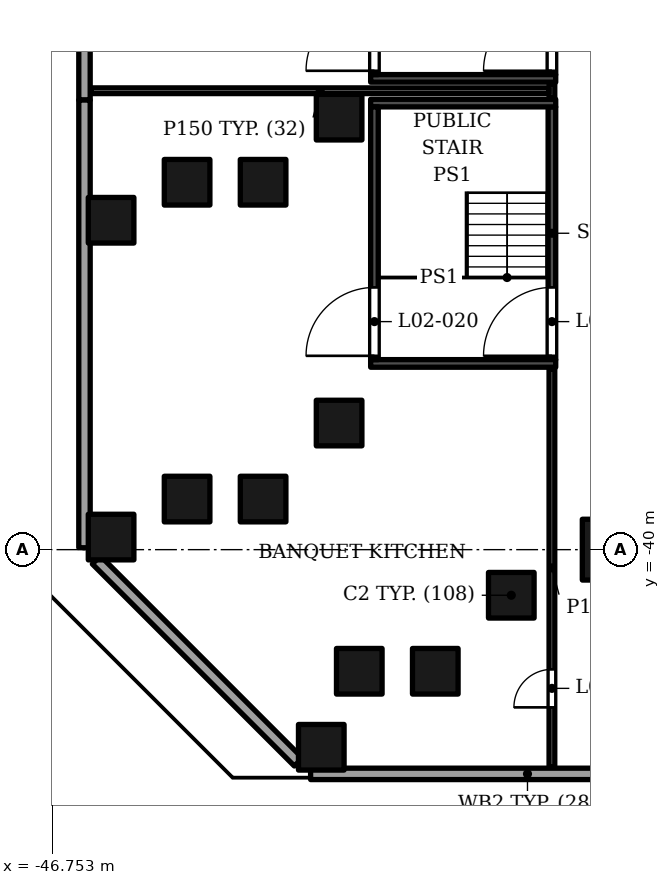
"""IFC4 building model, lengths in metres.
Left out: names, types, materials, properties, quantities, classifications, styles, units other than length and angle.
Written with IfcOpenShell. Run it as: python <this file> out.ifc"""

import sys

from ifc_helpers import new_model, si_unit, direction, frame, frame_2d, origin, origin_2d, place, context, subcontext, project, spatial, rectangle, extrude, element, fill, save


model = new_model("IFC4")
c1 = context("Model", 3, precision=1e-05, world=origin(), true_north=direction((0.0, 1.0)))
c2 = subcontext(c1, "Body", "Model", "MODEL_VIEW")
j1 = project(units=[si_unit("LENGTHUNIT", "METRE"), si_unit("PLANEANGLEUNIT", "RADIAN")], contexts=[c1])
p1 = place(None, origin())
s1 = spatial("IfcSite", under=j1, at=p1, CompositionType="ELEMENT")
p2 = place(p1, origin())
s2 = spatial("IfcBuilding", under=s1, at=p2, CompositionType="ELEMENT")
p3 = place(p2, frame((0.0, 0.0, 20.0)))
s3 = spatial("IfcBuildingStorey", under=s2, at=p3, CompositionType="ELEMENT", Elevation=20.0)
p4 = place(p3, frame((-32.0, -40.0, 0.0), z_axis=(0.0, 0.0, 1.0), x_axis=(1.0, 0.0, 0.0)))
e1 = element("IfcColumn", 1, at=p4, inside=s3, PredefinedType="COLUMN", context=c2, shape_type="SweptSolid", body=[
    extrude(rectangle(XDim=1.6, YDim=1.6, at=origin_2d()), origin(), (0.0, 0.0, 1.0), 9.0),
])
for number, where, z_axis, x_axis in (
    (2, (-34.669, -41.2, 0.0), (0.0, 0.0, 1.0), (1.0, 0.0, 0.0)),
    (3, (-39.2, -36.669, 0.0), (0.0, 0.0, 1.0), (1.0, 0.0, 0.0)),
    (4, (-39.2, -28.62, 0.0), (0.0, 0.0, 1.0), (1.0, 0.0, 0.0)),
    (5, (-36.669, -43.2, 0.0), (0.0, 0.0, 1.0), (1.0, 0.0, 0.0)),
    (6, (-41.2, -38.669, 0.0), (0.0, 0.0, 1.0), (1.0, 0.0, 0.0)),
    (7, (-41.2, -30.333, 0.0), (0.0, 0.0, 1.0), (1.0, 0.0, 0.0)),
    (8, (-38.669, -43.2, 0.0), (0.0, 0.0, 1.0), (1.0, 0.0, 0.0)),
    (9, (-43.2, -38.669, 0.0), (0.0, 0.0, 1.0), (1.0, 0.0, 0.0)),
    (10, (-43.2, -30.333, 0.0), (0.0, 0.0, 1.0), (1.0, 0.0, 0.0)),
    (11, (-39.669, -45.2, 0.0), (0.0, 0.0, 1.0), (1.0, 0.0, 0.0)),
    (12, (-45.2, -39.669, 0.0), (0.0, 0.0, 1.0), (1.0, 0.0, 0.0)),
    (13, (-45.2, -31.333, 0.0), (0.0, 0.0, 1.0), (1.0, 0.0, 0.0)),
):
    element("IfcColumn", number, at=place(p3, frame(where, z_axis=z_axis, x_axis=x_axis)), inside=s3, PredefinedType="COLUMN", context=c2, shape_type="SweptSolid", body=[
        extrude(rectangle(XDim=1.2, YDim=1.2, at=origin_2d()), origin(), (0.0, 0.0, 1.0), 9.0),
    ])
p5 = place(p3, frame((-39.95, -45.9, 0.0), z_axis=(0.0, 0.0, 1.0), x_axis=(1.0, 0.0, 0.0)))
e14 = element("IfcWall", 14, at=p5, inside=s3, PredefinedType="SOLIDWALL", context=c2, shape_type="SweptSolid", body=[
    extrude(rectangle(XDim=11.414, YDim=0.3, at=frame_2d((5.707, 0.0))), origin(), (0.0, 0.0, 1.0), 7.6),
])
for number, where, z_axis, x_axis in (
    (15, (-45.9, -16.39, 0.0), (0.0, 0.0, 1.0), (0.0, -1.0, 0.0)),
    (16, (-45.9, -28.17, 0.0), (0.0, 0.0, 1.0), (0.0, -1.0, 0.0)),
):
    element("IfcWall", number, at=place(p3, frame(where, z_axis=z_axis, x_axis=x_axis)), inside=s3, PredefinedType="SOLIDWALL", context=c2, shape_type="SweptSolid", body=[
        extrude(rectangle(XDim=11.78, YDim=0.3, at=frame_2d((5.89, 0.0))), origin(), (0.0, 0.0, 1.0), 7.6),
    ])
p6 = place(p3, frame((-45.588, -40.271, 0.0), z_axis=(0.0, 0.0, 1.0), x_axis=(0.707106781187, -0.707106781187, 0.0)))
e17 = element("IfcWall", 17, at=p6, inside=s3, PredefinedType="SOLIDWALL", context=c2, shape_type="SweptSolid", body=[
    extrude(rectangle(XDim=7.519, YDim=0.3, at=frame_2d((3.759, 0.0))), origin(), (0.0, 0.0, 1.0), 7.6),
])
p7 = place(p3, frame((-40.0, -45.85, 9.0), z_axis=(0.0, 0.0, 1.0), x_axis=(1.0, 0.0, 0.0)))
e18 = element("IfcWall", 18, at=p7, inside=s3, PredefinedType="PARAPET", context=c2, shape_type="SweptSolid", body=[
    extrude(rectangle(XDim=16.0, YDim=0.3, at=frame_2d((8.0, 0.0))), origin(), (0.0, 0.0, 1.0), 1.1),
])
p8 = place(p3, frame((-45.85, -25.302, 9.0), z_axis=(0.0, 0.0, 1.0), x_axis=(0.0, -1.0, 0.0)))
e19 = element("IfcWall", 19, at=p8, inside=s3, PredefinedType="PARAPET", context=c2, shape_type="SweptSolid", body=[
    extrude(rectangle(XDim=14.698, YDim=0.3, at=frame_2d((7.349, 0.0))), origin(), (0.0, 0.0, 1.0), 1.1),
])
p9 = place(p3, frame((-45.745, -40.042, 9.0), z_axis=(0.0, 0.0, 1.0), x_axis=(0.707092029666, -0.7071215324, 0.0)))
e20 = element("IfcWall", 20, at=p9, inside=s3, PredefinedType="PARAPET", context=c2, shape_type="SweptSolid", body=[
    extrude(rectangle(XDim=8.275, YDim=0.3, at=frame_2d((4.138, 0.0))), origin(), (0.0, 0.0, 1.0), 1.1),
])
for number, where, z_axis, x_axis in (
    (21, (-38.37, -35.1, 0.0), (0.0, 0.0, 1.0), (1.0, 0.0, 0.0)),
    (22, (-38.37, -28.25, 0.0), (0.0, 0.0, 1.0), (1.0, 0.0, 0.0)),
):
    element("IfcWall", number, at=place(p3, frame(where, z_axis=z_axis, x_axis=x_axis)), inside=s3, PredefinedType="SOLIDWALL", context=c2, shape_type="SweptSolid", body=[
        extrude(rectangle(XDim=4.87, YDim=0.2, at=frame_2d((2.435, 0.0))), origin(), (0.0, 0.0, 1.0), 8.55),
    ])
p10 = place(p3, frame((-38.27, -35.0, 0.0), z_axis=(0.0, 0.0, 1.0), x_axis=(0.0, 1.0, 0.0)))
e23 = element("IfcWall", 23, at=p10, inside=s3, PredefinedType="SOLIDWALL", context=c2, shape_type="SweptSolid", body=[
    extrude(rectangle(XDim=6.65, YDim=0.2, at=frame_2d((3.325, 0.0))), origin(), (0.0, 0.0, 1.0), 8.55),
])
p11 = place(p10, frame((0.1, 0.0, 0.0)))
e24 = element("IfcOpeningElement", 24, at=p11, cuts=e23, PredefinedType="OPENING", context=c2, shape_type="SweptSolid", body=[
    extrude(rectangle(XDim=1.8, YDim=2.4, at=frame_2d((0.9, 1.2))), frame((0.0, 0.11, 0.0), z_axis=(0.0, -1.0, 0.0), x_axis=(1.0, 0.0, 0.0)), (0.0, 0.0, 1.0), 0.22),
])
p12 = place(p3, frame((-33.6, -35.0, 0.0), z_axis=(0.0, 0.0, 1.0), x_axis=(0.0, 1.0, 0.0)))
e25 = element("IfcWall", 25, at=p12, inside=s3, PredefinedType="SOLIDWALL", context=c2, shape_type="SweptSolid", body=[
    extrude(rectangle(XDim=6.65, YDim=0.2, at=frame_2d((3.325, 0.0))), origin(), (0.0, 0.0, 1.0), 8.55),
])
p13 = place(p12, frame((0.1, 0.0, 0.0)))
e26 = element("IfcOpeningElement", 26, at=p13, cuts=e25, PredefinedType="OPENING", context=c2, shape_type="SweptSolid", body=[
    extrude(rectangle(XDim=1.8, YDim=2.4, at=frame_2d((0.9, 1.2))), frame((0.0, 0.11, 0.0), z_axis=(0.0, -1.0, 0.0), x_axis=(1.0, 0.0, 0.0)), (0.0, 0.0, 1.0), 0.22),
])
p14 = place(p3, frame((-38.37, -27.6, 0.0), z_axis=(0.0, 0.0, 1.0), x_axis=(1.0, 0.0, 0.0)))
e27 = element("IfcWall", 27, at=p14, inside=s3, PredefinedType="SOLIDWALL", context=c2, shape_type="SweptSolid", body=[
    extrude(rectangle(XDim=4.87, YDim=0.2, at=frame_2d((2.435, 0.0))), origin(), (0.0, 0.0, 1.0), 8.55),
])
p15 = place(p3, frame((-38.27, -27.5, 0.0), z_axis=(0.0, 0.0, 1.0), x_axis=(0.0, 1.0, 0.0)))
e28 = element("IfcWall", 28, at=p15, inside=s3, PredefinedType="SOLIDWALL", context=c2, shape_type="SweptSolid", body=[
    extrude(rectangle(XDim=6.65, YDim=0.2, at=frame_2d((3.325, 0.0))), origin(), (0.0, 0.0, 1.0), 8.55),
])
p16 = place(p15, frame((0.1, 0.0, 0.0)))
e29 = element("IfcOpeningElement", 29, at=p16, cuts=e28, PredefinedType="OPENING", context=c2, shape_type="SweptSolid", body=[
    extrude(rectangle(XDim=1.8, YDim=2.4, at=frame_2d((0.9, 1.2))), frame((0.0, 0.11, 0.0), z_axis=(0.0, -1.0, 0.0), x_axis=(1.0, 0.0, 0.0)), (0.0, 0.0, 1.0), 0.22),
])
p17 = place(p3, frame((-33.6, -27.5, 0.0), z_axis=(0.0, 0.0, 1.0), x_axis=(0.0, 1.0, 0.0)))
e30 = element("IfcWall", 30, at=p17, inside=s3, PredefinedType="SOLIDWALL", context=c2, shape_type="SweptSolid", body=[
    extrude(rectangle(XDim=6.65, YDim=0.2, at=frame_2d((3.325, 0.0))), origin(), (0.0, 0.0, 1.0), 8.55),
])
p18 = place(p17, frame((0.1, 0.0, 0.0)))
e31 = element("IfcOpeningElement", 31, at=p18, cuts=e30, PredefinedType="OPENING", context=c2, shape_type="SweptSolid", body=[
    extrude(rectangle(XDim=1.8, YDim=2.4, at=frame_2d((0.9, 1.2))), frame((0.0, 0.11, 0.0), z_axis=(0.0, -1.0, 0.0), x_axis=(1.0, 0.0, 0.0)), (0.0, 0.0, 1.0), 0.22),
])
p19 = place(p3, frame((-33.6, -45.72, 0.0), z_axis=(0.0, 0.0, 1.0), x_axis=(0.0, 1.0, 0.0)))
e32 = element("IfcWall", 32, at=p19, inside=s3, PredefinedType="PARTITIONING", context=c2, shape_type="SweptSolid", body=[
    extrude(rectangle(XDim=10.48, YDim=0.15, at=frame_2d((5.24, 0.0))), origin(), (0.0, 0.0, 1.0), 7.35),
])
p20 = place(p19, frame((1.57, 0.0, 0.0)))
e33 = element("IfcOpeningElement", 33, at=p20, cuts=e32, PredefinedType="OPENING", context=c2, shape_type="SweptSolid", body=[
    extrude(rectangle(XDim=1.0, YDim=2.1, at=frame_2d((0.5, 1.05))), frame((0.0, 0.085, 0.0), z_axis=(0.0, -1.0, 0.0), x_axis=(1.0, 0.0, 0.0)), (0.0, 0.0, 1.0), 0.17),
])
p21 = place(p3, frame((-33.6, -28.11, 0.0), z_axis=(0.0, 0.0, 1.0), x_axis=(0.0, 1.0, 0.0)))
e34 = element("IfcWall", 34, at=p21, inside=s3, PredefinedType="PARTITIONING", context=c2, shape_type="SweptSolid", body=[
    extrude(rectangle(XDim=0.37, YDim=0.15, at=frame_2d((0.185, 0.0))), origin(), (0.0, 0.0, 1.0), 8.55),
])
p22 = place(p3, frame((-45.72, -27.925, 0.0), z_axis=(0.0, 0.0, 1.0), x_axis=(1.0, 0.0, 0.0)))
e35 = element("IfcWall", 35, at=p22, inside=s3, PredefinedType="PARTITIONING", context=c2, shape_type="SweptSolid", body=[
    extrude(rectangle(XDim=12.045, YDim=0.15, at=frame_2d((6.022, 0.0))), origin(), (0.0, 0.0, 1.0), 7.65),
])
p23 = place(p13, origin())
e36 = element("IfcDoor", 36, at=p23, inside=s3, OperationType="DOUBLE_DOOR_SINGLE_SWING", PredefinedType="DOOR", context=c2, shape_type="SweptSolid", body=[
    extrude(rectangle(XDim=1.8, YDim=2.4, at=frame_2d((0.9, 1.2))), frame((0.0, 0.025, 0.0), z_axis=(0.0, -1.0, 0.0), x_axis=(1.0, 0.0, 0.0)), (0.0, 0.0, 1.0), 0.05),
])
fill(e26, e36)
p24 = place(p11, origin())
e37 = element("IfcDoor", 37, at=p24, inside=s3, OperationType="DOUBLE_DOOR_SINGLE_SWING", PredefinedType="DOOR", context=c2, shape_type="SweptSolid", body=[
    extrude(rectangle(XDim=1.8, YDim=2.4, at=frame_2d((0.9, 1.2))), frame((0.0, 0.025, 0.0), z_axis=(0.0, -1.0, 0.0), x_axis=(1.0, 0.0, 0.0)), (0.0, 0.0, 1.0), 0.05),
])
fill(e24, e37)
p25 = place(p18, origin())
e38 = element("IfcDoor", 38, at=p25, inside=s3, OperationType="DOUBLE_DOOR_SINGLE_SWING", PredefinedType="DOOR", context=c2, shape_type="SweptSolid", body=[
    extrude(rectangle(XDim=1.8, YDim=2.4, at=frame_2d((0.9, 1.2))), frame((0.0, 0.025, 0.0), z_axis=(0.0, -1.0, 0.0), x_axis=(1.0, 0.0, 0.0)), (0.0, 0.0, 1.0), 0.05),
])
fill(e31, e38)
p26 = place(p16, origin())
e39 = element("IfcDoor", 39, at=p26, inside=s3, OperationType="DOUBLE_DOOR_SINGLE_SWING", PredefinedType="DOOR", context=c2, shape_type="SweptSolid", body=[
    extrude(rectangle(XDim=1.8, YDim=2.4, at=frame_2d((0.9, 1.2))), frame((0.0, 0.025, 0.0), z_axis=(0.0, -1.0, 0.0), x_axis=(1.0, 0.0, 0.0)), (0.0, 0.0, 1.0), 0.05),
])
fill(e29, e39)
p27 = place(p20, origin())
e40 = element("IfcDoor", 40, at=p27, inside=s3, OperationType="SINGLE_SWING_LEFT", PredefinedType="DOOR", context=c2, shape_type="SweptSolid", body=[
    extrude(rectangle(XDim=1.0, YDim=2.1, at=frame_2d((0.5, 1.05))), frame((0.0, 0.025, 0.0), z_axis=(0.0, -1.0, 0.0), x_axis=(1.0, 0.0, 0.0)), (0.0, 0.0, 1.0), 0.05),
])
fill(e33, e40)
save(model, sys.argv[1])
